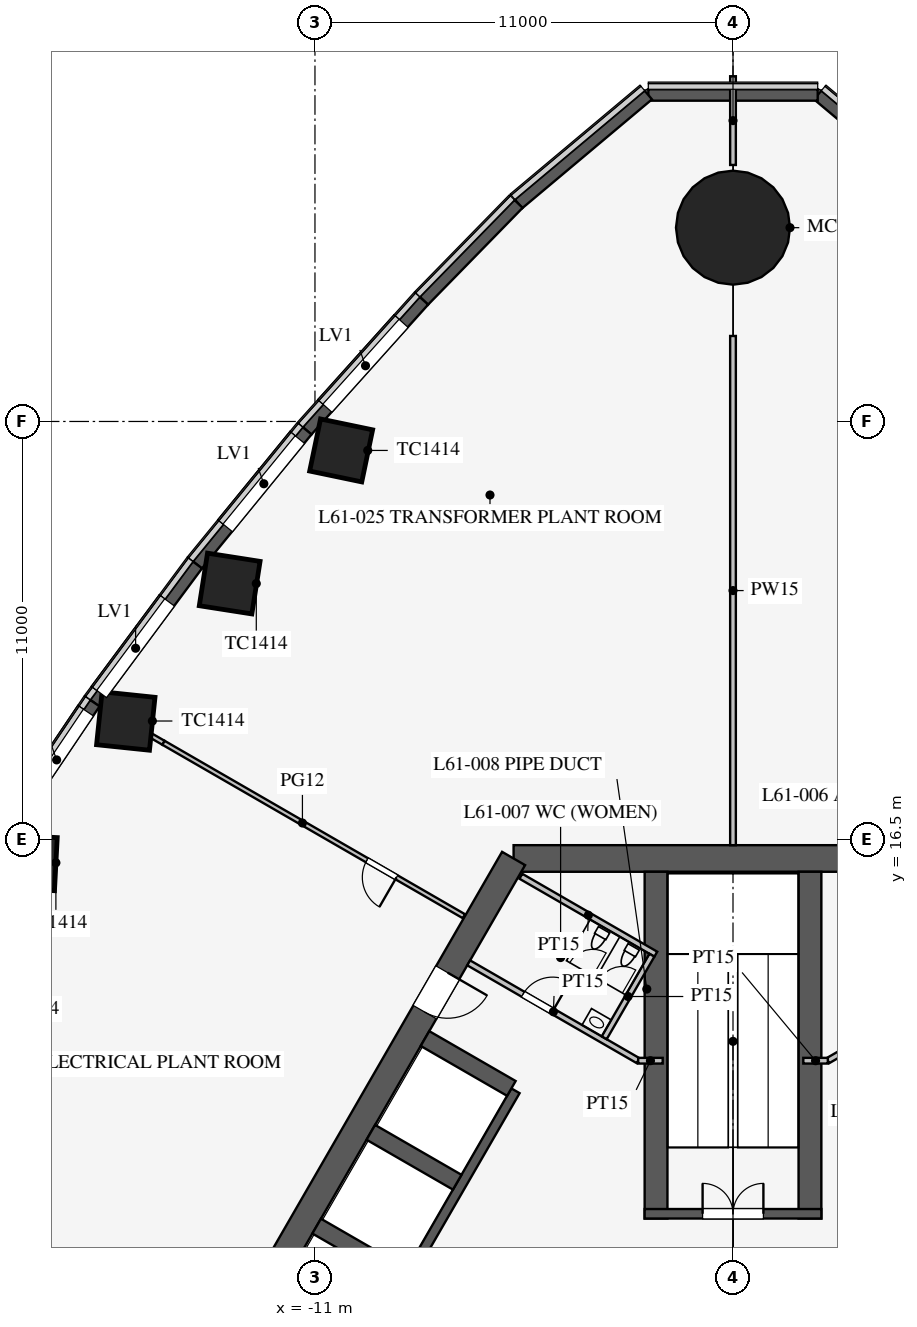
"""IFC4 building model, lengths in metres.
Left out: names, types, materials, properties, quantities, classifications, styles, units other than length and angle.
Written with IfcOpenShell. Run it as: python <this file> out.ifc"""

import sys

from ifc_helpers import new_model, si_unit, direction, frame, frame_2d, origin, origin_2d, place, context, subcontext, project, spatial, polyline, rectangle, circle, outline, extrude, clip, halfspace, element, fill, save


model = new_model("IFC4")
c1 = context("Model", 3, precision=1e-05, world=origin(), true_north=direction((0.0, 1.0)))
c2 = subcontext(c1, "Body", "Model", "MODEL_VIEW")
j1 = project(units=[si_unit("LENGTHUNIT", "METRE"), si_unit("PLANEANGLEUNIT", "RADIAN")], contexts=[c1])
p1 = place(None, origin())
s1 = spatial("IfcSite", under=j1, at=p1, CompositionType="ELEMENT")
p2 = place(p1, origin())
s2 = spatial("IfcBuilding", under=s1, at=p2, CompositionType="ELEMENT")
p3 = place(p2, frame((0.0, 0.0, 265.3)))
s3 = spatial("IfcBuildingStorey", under=s2, at=p3, CompositionType="ELEMENT", Elevation=265.3)
p4 = place(p3, frame((-10.632, 26.923, 0.0), z_axis=(0.255546793754, -0.147542991373, 0.955472083265), x_axis=(-0.65837980311, -0.750272089652, 0.060231439844)))
e1 = element("IfcColumn", 1, at=p4, inside=s3, PredefinedType="COLUMN", context=c2, shape_type="Clipping", body=[
    clip(clip(extrude(rectangle(XDim=1.4, YDim=1.4, at=origin_2d()), origin(), (0.0, 0.0, 1.0), 6.28), halfspace(frame((0.0, 0.0, 0.257), z_axis=(2.541375274736635e-06, -2.483352466137179e-05, 0.9999999996884188), x_axis=(0.0, 0.9999999996916481, 2.4833524661451983e-05)), True)), halfspace(frame((0.0, 0.0, 6.023), z_axis=(-2.541375274736635e-06, 2.483352466137179e-05, -0.9999999996884188), x_axis=(0.0, -0.9999999996916481, -2.4833524661451983e-05)), True)),
])
p5 = place(p3, frame((-13.522, 23.396, 0.0), z_axis=(0.223892186637, -0.129241135826, 0.966006737851), x_axis=(-0.623193661638, -0.78104689372, 0.039942582606)))
e2 = element("IfcColumn", 2, at=p5, inside=s3, PredefinedType="COLUMN", context=c2, shape_type="Clipping", body=[
    clip(clip(extrude(rectangle(XDim=1.4, YDim=1.4, at=origin_2d()), origin(), (0.0, 0.0, 1.0), 6.211), halfspace(frame((0.0, 0.0, 0.215), z_axis=(2.063244910444073e-05, -2.579208150971235e-06, 0.9999999997838249), x_axis=(0.0, 0.9999999999966739, 2.579208151520217e-06)), True)), halfspace(frame((0.0, 0.0, 5.996), z_axis=(-2.063244910444073e-05, 2.579208150971235e-06, -0.9999999997838249), x_axis=(0.0, -0.9999999999966739, -2.579208151520217e-06)), True)),
])
p6 = place(p3, frame((-16.227, 19.761, 0.0), z_axis=(0.201282046639, -0.116233851942, 0.972612579275), x_axis=(-0.584672708009, -0.810911567532, 0.024088465132)))
e3 = element("IfcColumn", 3, at=p6, inside=s3, PredefinedType="COLUMN", context=c2, shape_type="Clipping", body=[
    clip(clip(extrude(rectangle(XDim=1.4, YDim=1.4, at=origin_2d()), origin(), (0.0, 0.0, 1.0), 6.169), halfspace(frame((0.0, 0.0, 0.185), z_axis=(-1.9384733546467386e-05, -1.123718108159144e-05, 0.999999999748979), x_axis=(0.0, 0.999999999936863, 1.1237181083702726e-05)), True)), halfspace(frame((0.0, 0.0, 5.984), z_axis=(1.9384733546467386e-05, 1.123718108159144e-05, -0.999999999748979), x_axis=(0.0, -0.999999999936863, -1.1237181083702726e-05)), True)),
])
p7 = place(p3, frame((-18.748, 16.02, 0.0), z_axis=(0.187766955789, -0.108401950994, 0.976213392315), x_axis=(-0.543261997309, -0.839487539175, 0.01127270373)))
e4 = element("IfcColumn", 4, at=p7, inside=s3, PredefinedType="COLUMN", context=c2, shape_type="Clipping", body=[
    clip(clip(extrude(rectangle(XDim=1.4, YDim=1.4, at=origin_2d()), origin(), (0.0, 0.0, 1.0), 6.146), halfspace(frame((0.0, 0.0, 0.164), z_axis=(5.122421756978066e-06, -9.263174689327915e-06, 0.9999999999439773), x_axis=(0.0, 0.9999999999570969, 9.263174689449444e-06)), True)), halfspace(frame((0.0, 0.0, 5.982), z_axis=(-5.122421756978066e-06, 9.263174689327915e-06, -0.9999999999439773), x_axis=(0.0, -0.9999999999570969, -9.263174689449444e-06)), True)),
])
p8 = place(p3, frame((0.0, 33.0, 0.0), z_axis=(0.0, -0.316227766017, 0.948683298051), x_axis=(1.0, 0.0, 0.0)))
e5 = element("IfcColumn", 5, at=p8, inside=s3, PredefinedType="COLUMN", context=c2, shape_type="Clipping", body=[
    clip(clip(extrude(circle(Radius=1.5, at=origin_2d()), origin(), (0.0, 0.0, 1.0), 6.324), halfspace(frame((0.0, 0.0, 0.501), z_axis=(0.0, 0.0, 1.0), x_axis=(0.0, 1.0, 0.0)), True)), halfspace(frame((0.0, 0.0, 5.823), z_axis=(0.0, 0.0, -1.0), x_axis=(0.0, -1.0, 0.0)), True)),
])
p9 = place(p3, frame((5.773, 16.0, 0.0), z_axis=(0.0, 0.0, 1.0), x_axis=(-1.0, 0.0, 0.0)))
e6 = element("IfcWall", 6, at=p9, inside=s3, PredefinedType="SHEAR", context=c2, shape_type="SweptSolid", body=[
    extrude(rectangle(XDim=11.547, YDim=0.7, at=frame_2d((5.773, 0.0))), origin(), (0.0, 0.0, 1.0), 6.0),
])
p10 = place(p3, frame((-5.773, 16.0, 0.0), z_axis=(0.0, 0.0, 1.0), x_axis=(-0.500002442456, -0.866023993627, 0.0)))
e7 = element("IfcWall", 7, at=p10, inside=s3, PredefinedType="SHEAR", context=c2, shape_type="SweptSolid", body=[
    extrude(rectangle(XDim=21.939, YDim=0.7, at=frame_2d((10.97, 0.0))), origin(), (0.0, 0.0, 1.0), 6.0),
])
p11 = place(p10, frame((17.27, 0.0, 0.0)))
e8 = element("IfcOpeningElement", 8, at=p11, cuts=e7, PredefinedType="OPENING", context=c2, shape_type="SweptSolid", body=[
    extrude(rectangle(XDim=1.2, YDim=2.1, at=frame_2d((0.6, 1.05))), frame((0.0, 0.36, 0.0), z_axis=(0.0, -1.0, 0.0), x_axis=(1.0, 0.0, 0.0)), (0.0, 0.0, 1.0), 0.72),
])
p12 = place(p10, frame((3.47, 0.0, 0.0)))
e9 = element("IfcOpeningElement", 9, at=p12, cuts=e7, PredefinedType="OPENING", context=c2, shape_type="SweptSolid", body=[
    extrude(rectangle(XDim=1.2, YDim=2.1, at=frame_2d((0.6, 1.05))), frame((0.0, 0.36, 0.0), z_axis=(0.0, -1.0, 0.0), x_axis=(1.0, 0.0, 0.0)), (0.0, 0.0, 1.0), 0.72),
])
p13 = place(p3, frame((-5.724, 9.886, 0.0), z_axis=(0.0, 0.0, 1.0), x_axis=(-0.500001763848, -0.866024385424, 0.0)))
e10 = element("IfcWall", 10, at=p13, inside=s3, PredefinedType="SHEAR", context=c2, shape_type="SweptSolid", body=[
    extrude(rectangle(XDim=11.4, YDim=0.25, at=frame_2d((5.7, 0.0))), origin(), (0.0, 0.0, 1.0), 6.0),
])
p14 = place(p13, frame((6.525, 0.0, 0.0)))
e11 = element("IfcOpeningElement", 11, at=p14, cuts=e10, PredefinedType="OPENING", context=c2, shape_type="SweptSolid", body=[
    extrude(rectangle(XDim=1.2, YDim=2.2, at=frame_2d((0.6, 1.1))), frame((0.0, 0.135, 0.0), z_axis=(0.0, -1.0, 0.0), x_axis=(1.0, 0.0, 0.0)), (0.0, 0.0, 1.0), 0.27),
])
p15 = place(p13, frame((9.375, 0.0, 0.0)))
e12 = element("IfcOpeningElement", 12, at=p15, cuts=e10, PredefinedType="OPENING", context=c2, shape_type="SweptSolid", body=[
    extrude(rectangle(XDim=1.2, YDim=2.2, at=frame_2d((0.6, 1.1))), frame((0.0, 0.135, 0.0), z_axis=(0.0, -1.0, 0.0), x_axis=(1.0, 0.0, 0.0)), (0.0, 0.0, 1.0), 0.27),
])
for number, where, z_axis, x_axis in (
    (13, (-5.832, 9.949, 0.0), (0.0, 0.0, 1.0), (-0.866, 0.5, 0.0)),
    (14, (-7.257, 7.481, 0.0), (0.0, 0.0, 1.0), (-0.866, 0.5, 0.0)),
    (15, (-8.682, 5.012, 0.0), (0.0, 0.0, 1.0), (-0.866, 0.5, 0.0)),
):
    element("IfcWall", number, at=place(p3, frame(where, z_axis=z_axis, x_axis=x_axis)), inside=s3, PredefinedType="SHEAR", context=c2, shape_type="SweptSolid", body=[
        extrude(rectangle(XDim=2.625, YDim=0.45, at=frame_2d((1.312, 0.0))), origin(), (0.0, 0.0, 1.0), 6.0),
    ])
for number, where, z_axis, x_axis in (
    (16, (2.025, 6.525, 0.0), (0.0, 0.0, 1.0), (0.0, 1.0, 0.0)),
    (17, (-2.025, 6.525, 0.0), (0.0, 0.0, 1.0), (0.0, 1.0, 0.0)),
):
    element("IfcWall", number, at=place(p3, frame(where, z_axis=z_axis, x_axis=x_axis)), inside=s3, PredefinedType="SHEAR", context=c2, shape_type="SweptSolid", body=[
        extrude(rectangle(XDim=9.125, YDim=0.6, at=frame_2d((4.562, 0.0))), origin(), (0.0, 0.0, 1.0), 6.0),
    ])
p16 = place(p3, frame((2.325, 6.65, 0.0), z_axis=(0.0, 0.0, 1.0), x_axis=(-1.0, 0.0, 0.0)))
e18 = element("IfcWall", 18, at=p16, inside=s3, PredefinedType="SHEAR", context=c2, shape_type="SweptSolid", body=[
    extrude(rectangle(XDim=4.65, YDim=0.25, at=frame_2d((2.325, 0.0))), origin(), (0.0, 0.0, 1.0), 6.0),
])
p17 = place(p16, frame((1.525, 0.0, 0.0)))
e19 = element("IfcOpeningElement", 19, at=p17, cuts=e18, PredefinedType="OPENING", context=c2, shape_type="SweptSolid", body=[
    extrude(rectangle(XDim=1.6, YDim=2.1, at=frame_2d((0.8, 1.05))), frame((0.0, 0.135, 0.0), z_axis=(0.0, -1.0, 0.0), x_axis=(1.0, 0.0, 0.0)), (0.0, 0.0, 1.0), 0.27),
])
for number, where, z_axis, x_axis in (
    (20, (5.644, 33.226, 0.0), (0.0, 0.0, 1.0), (-0.766, 0.643, 0.0)),
    (21, (2.229, 36.092, 0.0), (0.0, 0.0, 1.0), (-1.0, 0.0, 0.0)),
    (22, (-2.229, 36.092, 0.0), (0.0, 0.0, 1.0), (-0.766, -0.643, 0.0)),
):
    element("IfcWall", number, at=place(p3, frame(where, z_axis=z_axis, x_axis=x_axis)), inside=s3, PredefinedType="SOLIDWALL", context=c2, shape_type="SweptSolid", body=[
        extrude(rectangle(XDim=4.458, YDim=0.3, at=frame_2d((2.229, 0.0))), origin(), (0.0, 0.0, 1.0), 5.8),
    ])
p18 = place(p3, frame((-5.644, 33.226, 0.0), z_axis=(0.0, 0.0, 1.0), x_axis=(-0.698630261643, -0.715482884154, 0.0)))
e23 = element("IfcWall", 23, at=p18, inside=s3, PredefinedType="SOLIDWALL", context=c2, shape_type="SweptSolid", body=[
    extrude(rectangle(XDim=3.564, YDim=0.3, at=frame_2d((1.782, 0.0))), origin(), (0.0, 0.0, 1.0), 5.8),
])
p19 = place(p3, frame((-8.133, 30.677, 0.0), z_axis=(0.0, 0.0, 1.0), x_axis=(-0.668245909458, -0.743940457626, 0.0)))
e24 = element("IfcWall", 24, at=p19, inside=s3, PredefinedType="SOLIDWALL", context=c2, shape_type="SweptSolid", body=[
    extrude(rectangle(XDim=4.599, YDim=0.3, at=frame_2d((2.3, 0.0))), origin(), (0.0, 0.0, 1.0), 5.8),
])
p20 = place(p19, frame((0.8, 0.0, 3.5)))
e25 = element("IfcOpeningElement", 25, at=p20, cuts=e24, PredefinedType="OPENING", context=c2, shape_type="SweptSolid", body=[
    extrude(rectangle(XDim=3.0, YDim=2.0, at=frame_2d((1.5, 1.0))), frame((0.0, 0.16, 0.0), z_axis=(0.0, -1.0, 0.0), x_axis=(1.0, 0.0, 0.0)), (0.0, 0.0, 1.0), 0.32),
])
p21 = place(p3, frame((-11.207, 27.255, 0.0), z_axis=(0.0, 0.0, 1.0), x_axis=(-0.632765292047, -0.774343647989, 0.0)))
e26 = element("IfcWall", 26, at=p21, inside=s3, PredefinedType="SOLIDWALL", context=c2, shape_type="SweptSolid", body=[
    extrude(rectangle(XDim=4.559, YDim=0.3, at=frame_2d((2.28, 0.0))), origin(), (0.0, 0.0, 1.0), 5.8),
])
p22 = place(p21, frame((0.3, 0.0, 3.5)))
e27 = element("IfcOpeningElement", 27, at=p22, cuts=e26, PredefinedType="OPENING", context=c2, shape_type="SweptSolid", body=[
    extrude(rectangle(XDim=3.0, YDim=2.0, at=frame_2d((1.5, 1.0))), frame((0.0, 0.16, 0.0), z_axis=(0.0, -1.0, 0.0), x_axis=(1.0, 0.0, 0.0)), (0.0, 0.0, 1.0), 0.32),
])
p23 = place(p3, frame((-14.092, 23.724, 0.0), z_axis=(0.0, 0.0, 1.0), x_axis=(-0.596173167565, -0.802855873912, 0.0)))
e28 = element("IfcWall", 28, at=p23, inside=s3, PredefinedType="SOLIDWALL", context=c2, shape_type="SweptSolid", body=[
    extrude(rectangle(XDim=4.53, YDim=0.3, at=frame_2d((2.265, 0.0))), origin(), (0.0, 0.0, 1.0), 5.8),
])
p24 = place(p23, frame((1.23, 0.0, 3.5)))
e29 = element("IfcOpeningElement", 29, at=p24, cuts=e28, PredefinedType="OPENING", context=c2, shape_type="SweptSolid", body=[
    extrude(rectangle(XDim=3.0, YDim=2.0, at=frame_2d((1.5, 1.0))), frame((0.0, 0.16, 0.0), z_axis=(0.0, -1.0, 0.0), x_axis=(1.0, 0.0, 0.0)), (0.0, 0.0, 1.0), 0.32),
])
p25 = place(p3, frame((-16.792, 20.087, 0.0), z_axis=(0.0, 0.0, 1.0), x_axis=(-0.558466624917, -0.829526991034, 0.0)))
e30 = element("IfcWall", 30, at=p25, inside=s3, PredefinedType="SOLIDWALL", context=c2, shape_type="SweptSolid", body=[
    extrude(rectangle(XDim=4.511, YDim=0.3, at=frame_2d((2.255, 0.0))), origin(), (0.0, 0.0, 1.0), 5.8),
])
p26 = place(p25, frame((0.3, 0.0, 3.5)))
e31 = element("IfcOpeningElement", 31, at=p26, cuts=e30, PredefinedType="OPENING", context=c2, shape_type="SweptSolid", body=[
    extrude(rectangle(XDim=3.0, YDim=2.0, at=frame_2d((1.5, 1.0))), frame((0.0, 0.16, 0.0), z_axis=(0.0, -1.0, 0.0), x_axis=(1.0, 0.0, 0.0)), (0.0, 0.0, 1.0), 0.32),
])
p27 = place(p3, frame((2.495, 10.678, 0.0), z_axis=(0.0, 0.0, 1.0), x_axis=(0.866037967349, 0.499978238636, 0.0)))
e32 = element("IfcWall", 32, at=p27, inside=s3, PredefinedType="PARTITIONING", context=c2, shape_type="SweptSolid", body=[
    extrude(rectangle(XDim=5.15, YDim=0.15, at=frame_2d((2.575, 0.0))), origin(), (0.0, 0.0, 1.0), 5.8),
])
p28 = place(p27, frame((2.6, 0.0, 0.0)))
e33 = element("IfcOpeningElement", 33, at=p28, cuts=e32, PredefinedType="OPENING", context=c2, shape_type="SweptSolid", body=[
    extrude(rectangle(XDim=0.9, YDim=2.1, at=frame_2d((0.45, 1.05))), frame((0.0, 0.085, 0.0), z_axis=(0.0, -1.0, 0.0), x_axis=(1.0, 0.0, 0.0)), (0.0, 0.0, 1.0), 0.17),
])
p29 = place(p3, frame((-2.495, 10.678, 0.0), z_axis=(0.0, 0.0, 1.0), x_axis=(-0.866037967349, 0.499978238636, 0.0)))
e34 = element("IfcWall", 34, at=p29, inside=s3, PredefinedType="PARTITIONING", context=c2, shape_type="SweptSolid", body=[
    extrude(rectangle(XDim=5.15, YDim=0.15, at=frame_2d((2.575, 0.0))), origin(), (0.0, 0.0, 1.0), 5.8),
])
p30 = place(p29, frame((2.6, 0.0, 0.0)))
e35 = element("IfcOpeningElement", 35, at=p30, cuts=e34, PredefinedType="OPENING", context=c2, shape_type="SweptSolid", body=[
    extrude(rectangle(XDim=0.9, YDim=2.1, at=frame_2d((0.45, 1.05))), frame((0.0, 0.085, 0.0), z_axis=(0.0, -1.0, 0.0), x_axis=(1.0, 0.0, 0.0)), (0.0, 0.0, 1.0), 0.17),
])
for number, where, z_axis, x_axis in (
    (36, (2.495, 10.678, 0.0), (0.0, 0.0, 1.0), (-1.0, 0.0, 0.0)),
    (37, (-2.495, 10.678, 0.0), (0.0, 0.0, 1.0), (1.0, 0.0, 0.0)),
):
    element("IfcWall", number, at=place(p3, frame(where, z_axis=z_axis, x_axis=x_axis)), inside=s3, PredefinedType="PARTITIONING", context=c2, shape_type="SweptSolid", body=[
        extrude(rectangle(XDim=0.645, YDim=0.15, at=frame_2d((0.323, 0.0))), origin(), (0.0, 0.0, 1.0), 5.8),
    ])
p31 = place(p3, frame((-2.031, 13.482, 0.0), z_axis=(0.0, 0.0, 1.0), x_axis=(-0.866050731258, 0.499956128963, 0.0)))
e38 = element("IfcWall", 38, at=p31, inside=s3, PredefinedType="PARTITIONING", context=c2, shape_type="SweptSolid", body=[
    extrude(rectangle(XDim=4.1, YDim=0.15, at=frame_2d((2.05, 0.0))), origin(), (0.0, 0.0, 1.0), 5.8),
])
p32 = place(p3, frame((-3.389, 11.281, 0.0), z_axis=(0.0, 0.0, 1.0), x_axis=(0.499989096993, 0.866031698547, 0.0)))
e39 = element("IfcWall", 39, at=p32, inside=s3, PredefinedType="PARTITIONING", context=c2, shape_type="SweptSolid", body=[
    extrude(rectangle(XDim=2.51, YDim=0.15, at=frame_2d((1.255, 0.0))), origin(), (0.0, 0.0, 1.0), 5.8),
])
p33 = place(p3, frame((0.0, 16.35, 0.0), z_axis=(0.0, 0.0, 1.0), x_axis=(0.0, 1.0, 0.0)))
e40 = element("IfcWall", 40, at=p33, inside=s3, PredefinedType="PARTITIONING", context=c2, shape_type="SweptSolid", body=[
    extrude(rectangle(XDim=13.4, YDim=0.15, at=frame_2d((6.7, 0.0))), origin(), (0.0, 0.0, 1.0), 4.3),
])
p34 = place(p3, frame((0.0, 34.25, 0.0), z_axis=(0.0, 0.0, 1.0), x_axis=(0.0, 1.0, 0.0)))
e41 = element("IfcWall", 41, at=p34, inside=s3, PredefinedType="PARTITIONING", context=c2, shape_type="SweptSolid", body=[
    extrude(rectangle(XDim=2.335, YDim=0.15, at=frame_2d((1.167, 0.0))), origin(), (0.0, 0.0, 1.0), 5.8),
])
p35 = place(p3, frame((-14.986, 19.044, 0.0), z_axis=(0.0, 0.0, 1.0), x_axis=(-0.865984622623, 0.500070628392, 0.0)))
e42 = element("IfcWall", 42, at=p35, inside=s3, PredefinedType="PARTITIONING", context=c2, shape_type="SweptSolid", body=[
    extrude(outline(polyline([(0.0, 0.0), (0.688, 0.0), (0.688, 0.05), (0.0, 2.9), (0.0, 0.0)])), frame((0.0, 0.06, 0.0), z_axis=(0.0, -1.0, 0.0), x_axis=(1.0, 0.0, 0.0)), (0.0, 0.0, 1.0), 0.12),
])
p36 = place(p3, frame((-7.079, 14.479, 0.0), z_axis=(0.0, 0.0, 1.0), x_axis=(-0.866026165896, 0.499998679983, 0.0)))
e43 = element("IfcWall", 43, at=p36, inside=s3, PredefinedType="PARTITIONING", context=c2, shape_type="SweptSolid", body=[
    extrude(rectangle(XDim=9.13, YDim=0.12, at=frame_2d((4.565, 0.0))), origin(), (0.0, 0.0, 1.0), 2.9),
])
p37 = place(p36, frame((2.05, 0.0, 0.0)))
e44 = element("IfcOpeningElement", 44, at=p37, cuts=e43, PredefinedType="OPENING", context=c2, shape_type="SweptSolid", body=[
    extrude(rectangle(XDim=0.9, YDim=2.1, at=frame_2d((0.45, 1.05))), frame((0.0, 0.07, 0.0), z_axis=(0.0, -1.0, 0.0), x_axis=(1.0, 0.0, 0.0)), (0.0, 0.0, 1.0), 0.14),
])
p38 = place(p20, origin())
e45 = element("IfcWindow", 45, at=p38, inside=s3, PartitioningType="SINGLE_PANEL", PredefinedType="USERDEFINED", context=c2, shape_type="SweptSolid", body=[
    extrude(rectangle(XDim=3.0, YDim=2.0, at=frame_2d((1.5, 1.0))), frame((0.0, 0.03, 0.0), z_axis=(0.0, -1.0, 0.0), x_axis=(1.0, 0.0, 0.0)), (0.0, 0.0, 1.0), 0.06),
])
fill(e25, e45)
p39 = place(p22, origin())
e46 = element("IfcWindow", 46, at=p39, inside=s3, PartitioningType="SINGLE_PANEL", PredefinedType="USERDEFINED", context=c2, shape_type="SweptSolid", body=[
    extrude(rectangle(XDim=3.0, YDim=2.0, at=frame_2d((1.5, 1.0))), frame((0.0, 0.03, 0.0), z_axis=(0.0, -1.0, 0.0), x_axis=(1.0, 0.0, 0.0)), (0.0, 0.0, 1.0), 0.06),
])
fill(e27, e46)
p40 = place(p24, origin())
e47 = element("IfcWindow", 47, at=p40, inside=s3, PartitioningType="SINGLE_PANEL", PredefinedType="USERDEFINED", context=c2, shape_type="SweptSolid", body=[
    extrude(rectangle(XDim=3.0, YDim=2.0, at=frame_2d((1.5, 1.0))), frame((0.0, 0.03, 0.0), z_axis=(0.0, -1.0, 0.0), x_axis=(1.0, 0.0, 0.0)), (0.0, 0.0, 1.0), 0.06),
])
fill(e29, e47)
p41 = place(p26, origin())
e48 = element("IfcWindow", 48, at=p41, inside=s3, PartitioningType="SINGLE_PANEL", PredefinedType="USERDEFINED", context=c2, shape_type="SweptSolid", body=[
    extrude(rectangle(XDim=3.0, YDim=2.0, at=frame_2d((1.5, 1.0))), frame((0.0, 0.03, 0.0), z_axis=(0.0, -1.0, 0.0), x_axis=(1.0, 0.0, 0.0)), (0.0, 0.0, 1.0), 0.06),
])
fill(e31, e48)
p42 = place(p30, frame((0.9, 0.0, 0.0), z_axis=(0.0, 0.0, 1.0), x_axis=(-1.0, 0.0, 0.0)))
e49 = element("IfcDoor", 49, at=p42, inside=s3, OperationType="SINGLE_SWING_RIGHT", PredefinedType="DOOR", context=c2, shape_type="SweptSolid", body=[
    extrude(rectangle(XDim=0.9, YDim=2.1, at=frame_2d((0.45, 1.05))), frame((0.0, 0.025, 0.0), z_axis=(0.0, -1.0, 0.0), x_axis=(1.0, 0.0, 0.0)), (0.0, 0.0, 1.0), 0.05),
])
fill(e35, e49)
p43 = place(p17, frame((1.6, 0.0, 0.0), z_axis=(0.0, 0.0, 1.0), x_axis=(-1.0, 0.0, 0.0)))
e50 = element("IfcDoor", 50, at=p43, inside=s3, OperationType="DOUBLE_DOOR_SINGLE_SWING", PredefinedType="DOOR", context=c2, shape_type="SweptSolid", body=[
    extrude(rectangle(XDim=1.6, YDim=2.1, at=frame_2d((0.8, 1.05))), frame((0.0, 0.025, 0.0), z_axis=(0.0, -1.0, 0.0), x_axis=(1.0, 0.0, 0.0)), (0.0, 0.0, 1.0), 0.05),
])
fill(e19, e50)
p44 = place(p12, origin())
e51 = element("IfcDoor", 51, at=p44, inside=s3, OperationType="SINGLE_SWING_LEFT", PredefinedType="DOOR", context=c2, shape_type="SweptSolid", body=[
    extrude(rectangle(XDim=1.2, YDim=2.1, at=frame_2d((0.6, 1.05))), frame((0.0, 0.025, 0.0), z_axis=(0.0, -1.0, 0.0), x_axis=(1.0, 0.0, 0.0)), (0.0, 0.0, 1.0), 0.05),
])
fill(e9, e51)
p45 = place(p37, origin())
e52 = element("IfcDoor", 52, at=p45, inside=s3, OperationType="SINGLE_SWING_LEFT", PredefinedType="DOOR", context=c2, shape_type="SweptSolid", body=[
    extrude(rectangle(XDim=0.9, YDim=2.1, at=frame_2d((0.45, 1.05))), frame((0.0, 0.025, 0.0), z_axis=(0.0, -1.0, 0.0), x_axis=(1.0, 0.0, 0.0)), (0.0, 0.0, 1.0), 0.05),
])
fill(e44, e52)
save(model, sys.argv[1])
